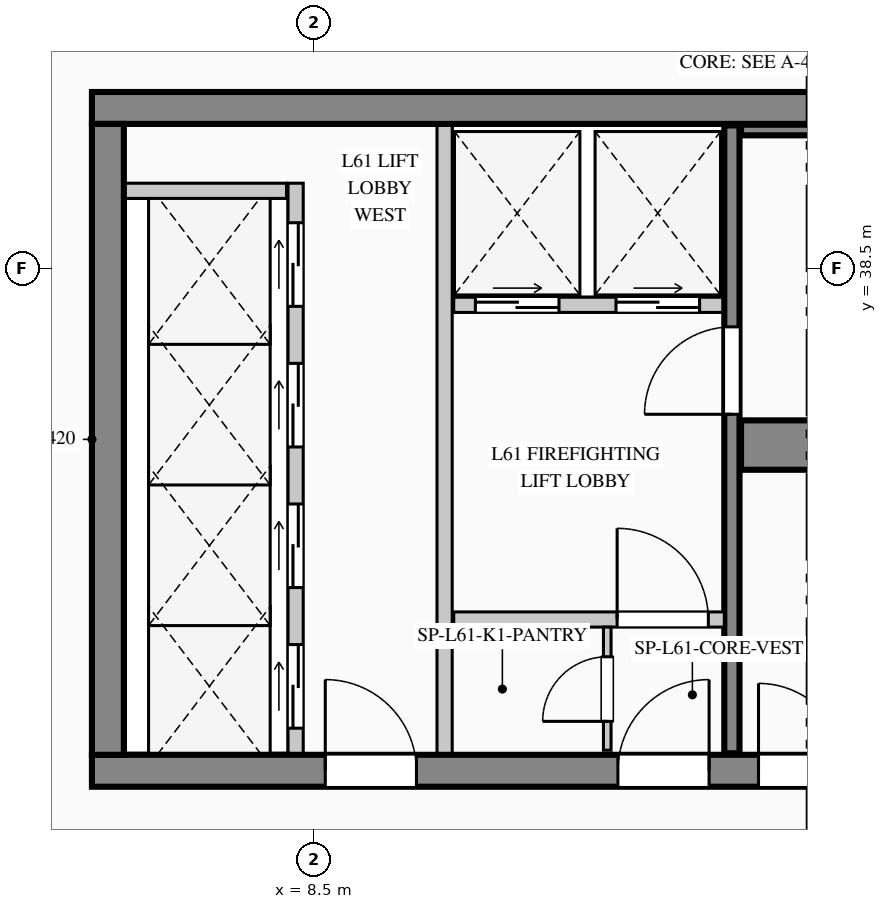
"""IFC4 building model, lengths in metres.
Left out: names, types, materials, properties, quantities, classifications, styles, units other than length and angle.
Written with IfcOpenShell. Run it as: python <this file> out.ifc"""

import sys

from ifc_helpers import new_model, si_unit, direction, frame, frame_2d, origin, place, context, subcontext, project, spatial, rectangle, extrude, element, fill, save


model = new_model("IFC4")
c1 = context("Model", 3, precision=1e-05, world=origin(), true_north=direction((0.0, 1.0)))
c2 = subcontext(c1, "Body", "Model", "MODEL_VIEW")
j1 = project(units=[si_unit("LENGTHUNIT", "METRE"), si_unit("PLANEANGLEUNIT", "RADIAN")], contexts=[c1])
p1 = place(None, origin())
s1 = spatial("IfcSite", under=j1, at=p1, CompositionType="ELEMENT")
p2 = place(p1, origin())
s2 = spatial("IfcBuilding", under=s1, at=p2, CompositionType="ELEMENT")
p3 = place(p2, frame((0.0, 0.0, 256.7)))
s3 = spatial("IfcBuildingStorey", under=s2, at=p3, CompositionType="ELEMENT", Elevation=256.7)
p4 = place(p3, frame((5.58, 40.61, 0.0), z_axis=(0.0, 0.0, 1.0), x_axis=(1.0, 0.0, 0.0)))
e1 = element("IfcWall", 1, at=p4, inside=s3, PredefinedType="SHEAR", context=c2, shape_type="SweptSolid", body=[
    extrude(rectangle(XDim=17.69, YDim=0.42, at=frame_2d((8.845, 0.0))), origin(), (0.0, 0.0, 1.0), 3.95),
])
p5 = place(p4, frame((15.865, 0.0, 0.0)))
e2 = element("IfcOpeningElement", 2, at=p5, cuts=e1, PredefinedType="OPENING", context=c2, shape_type="SweptSolid", body=[
    extrude(rectangle(XDim=1.18, YDim=2.25, at=frame_2d((0.59, 1.125))), frame((0.0, 0.22, 0.0), z_axis=(0.0, -1.0, 0.0), x_axis=(1.0, 0.0, 0.0)), (0.0, 0.0, 1.0), 0.44),
])
p6 = place(p3, frame((5.58, 31.89, 0.0), z_axis=(0.0, 0.0, 1.0), x_axis=(1.0, 0.0, 0.0)))
e3 = element("IfcWall", 3, at=p6, inside=s3, PredefinedType="SHEAR", context=c2, shape_type="SweptSolid", body=[
    extrude(rectangle(XDim=17.69, YDim=0.42, at=frame_2d((8.845, 0.0))), origin(), (0.0, 0.0, 1.0), 3.95),
])
p7 = place(p6, frame((3.07, 0.0, 0.0)))
e4 = element("IfcOpeningElement", 4, at=p7, cuts=e3, PredefinedType="OPENING", context=c2, shape_type="SweptSolid", body=[
    extrude(rectangle(XDim=1.2, YDim=2.2, at=frame_2d((0.6, 1.1))), frame((0.0, 0.22, 0.0), z_axis=(0.0, -1.0, 0.0), x_axis=(1.0, 0.0, 0.0)), (0.0, 0.0, 1.0), 0.44),
])
p8 = place(p6, frame((6.92, 0.0, 0.0)))
e5 = element("IfcOpeningElement", 5, at=p8, cuts=e3, PredefinedType="OPENING", context=c2, shape_type="SweptSolid", body=[
    extrude(rectangle(XDim=1.2, YDim=2.2, at=frame_2d((0.6, 1.1))), frame((0.0, 0.22, 0.0), z_axis=(0.0, -1.0, 0.0), x_axis=(1.0, 0.0, 0.0)), (0.0, 0.0, 1.0), 0.44),
])
p9 = place(p6, frame((8.77, 0.0, 0.0)))
e6 = element("IfcOpeningElement", 6, at=p9, cuts=e3, PredefinedType="OPENING", context=c2, shape_type="SweptSolid", body=[
    extrude(rectangle(XDim=1.15, YDim=2.2, at=frame_2d((0.575, 1.1))), frame((0.0, 0.22, 0.0), z_axis=(0.0, -1.0, 0.0), x_axis=(1.0, 0.0, 0.0)), (0.0, 0.0, 1.0), 0.44),
])
p10 = place(p6, frame((15.87, 0.0, 0.0)))
e7 = element("IfcOpeningElement", 7, at=p10, cuts=e3, PredefinedType="OPENING", context=c2, shape_type="SweptSolid", body=[
    extrude(rectangle(XDim=1.2, YDim=2.2, at=frame_2d((0.6, 1.1))), frame((0.0, 0.22, 0.0), z_axis=(0.0, -1.0, 0.0), x_axis=(1.0, 0.0, 0.0)), (0.0, 0.0, 1.0), 0.44),
])
p11 = place(p3, frame((5.79, 32.1, 0.0), z_axis=(0.0, 0.0, 1.0), x_axis=(0.0, 1.0, 0.0)))
e8 = element("IfcWall", 8, at=p11, inside=s3, PredefinedType="SHEAR", context=c2, shape_type="SweptSolid", body=[
    extrude(rectangle(XDim=8.3, YDim=0.42, at=frame_2d((4.15, 0.0))), origin(), (0.0, 0.0, 1.0), 3.95),
])
p12 = place(p3, frame((14.0, 32.12, 0.0), z_axis=(0.0, 0.0, 1.0), x_axis=(0.0, 1.0, 0.0)))
e9 = element("IfcWall", 9, at=p12, inside=s3, PredefinedType="SHEAR", context=c2, shape_type="SweptSolid", body=[
    extrude(rectangle(XDim=8.26, YDim=0.2, at=frame_2d((4.13, 0.0))), origin(), (0.0, 0.0, 1.0), 3.95),
])
p13 = place(p12, frame((4.46, 0.0, 0.0)))
e10 = element("IfcOpeningElement", 10, at=p13, cuts=e9, PredefinedType="OPENING", context=c2, shape_type="SweptSolid", body=[
    extrude(rectangle(XDim=1.15, YDim=2.2, at=frame_2d((0.575, 1.1))), frame((0.0, 0.11, 0.0), z_axis=(0.0, -1.0, 0.0), x_axis=(1.0, 0.0, 0.0)), (0.0, 0.0, 1.0), 0.22),
])
p14 = place(p3, frame((14.12, 36.175, 0.0), z_axis=(0.0, 0.0, 1.0), x_axis=(1.0, 0.0, 0.0)))
e11 = element("IfcWall", 11, at=p14, inside=s3, PredefinedType="SHEAR", context=c2, shape_type="SweptSolid", body=[
    extrude(rectangle(XDim=7.01, YDim=0.65, at=frame_2d((3.505, 0.0))), origin(), (0.0, 0.0, 1.0), 3.95),
])
p15 = place(p3, frame((14.12, 40.32, 0.0), z_axis=(0.0, 0.0, 1.0), x_axis=(1.0, 0.0, 0.0)))
e12 = element("IfcWall", 12, at=p15, inside=s3, PredefinedType="SHEAR", context=c2, shape_type="SweptSolid", body=[
    extrude(rectangle(XDim=7.01, YDim=0.14, at=frame_2d((3.505, 0.0))), origin(), (0.0, 0.0, 1.0), 3.95),
])
p16 = place(p3, frame((6.133, 4.42, 0.0), z_axis=(0.0, 0.0, 1.0), x_axis=(-0.089522678378, 0.995984784048, 0.0)))
e13 = element("IfcWall", 13, at=p16, inside=s3, PredefinedType="STANDARD", context=c2, shape_type="SweptSolid", body=[
    extrude(rectangle(XDim=37.31, YDim=0.24, at=frame_2d((18.655, 0.0))), origin(), (0.0, 0.0, 1.0), 3.7),
])
p17 = place(p16, frame((23.053, 0.0, 0.9)))
e14 = element("IfcOpeningElement", 14, at=p17, cuts=e13, PredefinedType="OPENING", context=c2, shape_type="SweptSolid", body=[
    extrude(rectangle(XDim=1.65, YDim=1.95, at=frame_2d((0.825, 0.975))), frame((0.0, 0.13, 0.0), z_axis=(0.0, -1.0, 0.0), x_axis=(1.0, 0.0, 0.0)), (0.0, 0.0, 1.0), 0.26),
])
p18 = place(p3, frame((8.26, 32.12, 0.0), z_axis=(0.0, 0.0, 1.0), x_axis=(0.0, 1.0, 0.0)))
e15 = element("IfcWall", 15, at=p18, inside=s3, PredefinedType="PARTITIONING", context=c2, shape_type="SweptSolid", body=[
    extrude(rectangle(XDim=7.5, YDim=0.2, at=frame_2d((3.75, 0.0))), origin(), (0.0, 0.0, 1.0), 3.7),
])
p19 = place(p18, frame((0.33, 0.0, 0.0)))
e16 = element("IfcOpeningElement", 16, at=p19, cuts=e15, PredefinedType="OPENING", context=c2, shape_type="SweptSolid", body=[
    extrude(rectangle(XDim=1.1, YDim=2.2, at=frame_2d((0.55, 1.1))), frame((0.0, 0.11, 0.0), z_axis=(0.0, -1.0, 0.0), x_axis=(1.0, 0.0, 0.0)), (0.0, 0.0, 1.0), 0.22),
])
p20 = place(p18, frame((2.18, 0.0, 0.0)))
e17 = element("IfcOpeningElement", 17, at=p20, cuts=e15, PredefinedType="OPENING", context=c2, shape_type="SweptSolid", body=[
    extrude(rectangle(XDim=1.1, YDim=2.2, at=frame_2d((0.55, 1.1))), frame((0.0, 0.11, 0.0), z_axis=(0.0, -1.0, 0.0), x_axis=(1.0, 0.0, 0.0)), (0.0, 0.0, 1.0), 0.22),
])
p21 = place(p18, frame((4.03, 0.0, 0.0)))
e18 = element("IfcOpeningElement", 18, at=p21, cuts=e15, PredefinedType="OPENING", context=c2, shape_type="SweptSolid", body=[
    extrude(rectangle(XDim=1.1, YDim=2.2, at=frame_2d((0.55, 1.1))), frame((0.0, 0.11, 0.0), z_axis=(0.0, -1.0, 0.0), x_axis=(1.0, 0.0, 0.0)), (0.0, 0.0, 1.0), 0.22),
])
p22 = place(p18, frame((5.88, 0.0, 0.0)))
e19 = element("IfcOpeningElement", 19, at=p22, cuts=e15, PredefinedType="OPENING", context=c2, shape_type="SweptSolid", body=[
    extrude(rectangle(XDim=1.1, YDim=2.2, at=frame_2d((0.55, 1.1))), frame((0.0, 0.11, 0.0), z_axis=(0.0, -1.0, 0.0), x_axis=(1.0, 0.0, 0.0)), (0.0, 0.0, 1.0), 0.22),
])
p23 = place(p3, frame((6.02, 39.52, 0.0), z_axis=(0.0, 0.0, 1.0), x_axis=(1.0, 0.0, 0.0)))
e20 = element("IfcWall", 20, at=p23, inside=s3, PredefinedType="PARTITIONING", context=c2, shape_type="SweptSolid", body=[
    extrude(rectangle(XDim=2.12, YDim=0.2, at=frame_2d((1.06, 0.0))), origin(), (0.0, 0.0, 1.0), 3.7),
])
p24 = place(p3, frame((10.22, 32.12, 0.0), z_axis=(0.0, 0.0, 1.0), x_axis=(0.0, 1.0, 0.0)))
e21 = element("IfcWall", 21, at=p24, inside=s3, PredefinedType="PARTITIONING", context=c2, shape_type="SweptSolid", body=[
    extrude(rectangle(XDim=8.26, YDim=0.2, at=frame_2d((4.13, 0.0))), origin(), (0.0, 0.0, 1.0), 3.7),
])
p25 = place(p3, frame((10.34, 38.02, 0.0), z_axis=(0.0, 0.0, 1.0), x_axis=(1.0, 0.0, 0.0)))
e22 = element("IfcWall", 22, at=p25, inside=s3, PredefinedType="PARTITIONING", context=c2, shape_type="SweptSolid", body=[
    extrude(rectangle(XDim=3.54, YDim=0.2, at=frame_2d((1.77, 0.0))), origin(), (0.0, 0.0, 1.0), 3.7),
])
p26 = place(p25, frame((0.285, 0.0, 0.0)))
e23 = element("IfcOpeningElement", 23, at=p26, cuts=e22, PredefinedType="OPENING", context=c2, shape_type="SweptSolid", body=[
    extrude(rectangle(XDim=1.1, YDim=2.2, at=frame_2d((0.55, 1.1))), frame((0.0, 0.11, 0.0), z_axis=(0.0, -1.0, 0.0), x_axis=(1.0, 0.0, 0.0)), (0.0, 0.0, 1.0), 0.22),
])
p27 = place(p25, frame((2.135, 0.0, 0.0)))
e24 = element("IfcOpeningElement", 24, at=p27, cuts=e22, PredefinedType="OPENING", context=c2, shape_type="SweptSolid", body=[
    extrude(rectangle(XDim=1.1, YDim=2.2, at=frame_2d((0.55, 1.1))), frame((0.0, 0.11, 0.0), z_axis=(0.0, -1.0, 0.0), x_axis=(1.0, 0.0, 0.0)), (0.0, 0.0, 1.0), 0.22),
])
p28 = place(p3, frame((10.34, 33.88, 0.0), z_axis=(0.0, 0.0, 1.0), x_axis=(1.0, 0.0, 0.0)))
e25 = element("IfcWall", 25, at=p28, inside=s3, PredefinedType="PARTITIONING", context=c2, shape_type="SweptSolid", body=[
    extrude(rectangle(XDim=3.56, YDim=0.2, at=frame_2d((1.78, 0.0))), origin(), (0.0, 0.0, 1.0), 3.7),
])
p29 = place(p28, frame((2.15, 0.0, 0.0)))
e26 = element("IfcOpeningElement", 26, at=p29, cuts=e25, PredefinedType="OPENING", context=c2, shape_type="SweptSolid", body=[
    extrude(rectangle(XDim=1.2, YDim=2.2, at=frame_2d((0.6, 1.1))), frame((0.0, 0.11, 0.0), z_axis=(0.0, -1.0, 0.0), x_axis=(1.0, 0.0, 0.0)), (0.0, 0.0, 1.0), 0.22),
])
p30 = place(p3, frame((12.36, 32.16, 0.0), z_axis=(0.0, 0.0, 1.0), x_axis=(0.0, 1.0, 0.0)))
e27 = element("IfcWall", 27, at=p30, inside=s3, PredefinedType="PARTITIONING", context=c2, shape_type="SweptSolid", body=[
    extrude(rectangle(XDim=1.62, YDim=0.1, at=frame_2d((0.81, 0.0))), origin(), (0.0, 0.0, 1.0), 3.7),
])
p31 = place(p30, frame((0.38, 0.0, 0.0)))
e28 = element("IfcOpeningElement", 28, at=p31, cuts=e27, PredefinedType="OPENING", context=c2, shape_type="SweptSolid", body=[
    extrude(rectangle(XDim=0.85, YDim=2.1, at=frame_2d((0.425, 1.05))), frame((0.0, 0.06, 0.0), z_axis=(0.0, -1.0, 0.0), x_axis=(1.0, 0.0, 0.0)), (0.0, 0.0, 1.0), 0.12),
])
p32 = place(p7, origin())
e29 = element("IfcDoor", 29, at=p32, inside=s3, OperationType="SINGLE_SWING_LEFT", PredefinedType="DOOR", context=c2, shape_type="SweptSolid", body=[
    extrude(rectangle(XDim=1.2, YDim=2.2, at=frame_2d((0.6, 1.1))), frame((0.0, 0.025, 0.0), z_axis=(0.0, -1.0, 0.0), x_axis=(1.0, 0.0, 0.0)), (0.0, 0.0, 1.0), 0.05),
])
fill(e4, e29)
p33 = place(p8, origin())
e30 = element("IfcDoor", 30, at=p33, inside=s3, OperationType="SINGLE_SWING_RIGHT", PredefinedType="DOOR", context=c2, shape_type="SweptSolid", body=[
    extrude(rectangle(XDim=1.2, YDim=2.2, at=frame_2d((0.6, 1.1))), frame((0.0, 0.025, 0.0), z_axis=(0.0, -1.0, 0.0), x_axis=(1.0, 0.0, 0.0)), (0.0, 0.0, 1.0), 0.05),
])
fill(e5, e30)
p34 = place(p9, origin())
e31 = element("IfcDoor", 31, at=p34, inside=s3, OperationType="SINGLE_SWING_LEFT", PredefinedType="DOOR", context=c2, shape_type="SweptSolid", body=[
    extrude(rectangle(XDim=1.15, YDim=2.2, at=frame_2d((0.575, 1.1))), frame((0.0, 0.025, 0.0), z_axis=(0.0, -1.0, 0.0), x_axis=(1.0, 0.0, 0.0)), (0.0, 0.0, 1.0), 0.05),
])
fill(e6, e31)
p35 = place(p29, origin())
e32 = element("IfcDoor", 32, at=p35, inside=s3, OperationType="SINGLE_SWING_LEFT", PredefinedType="DOOR", context=c2, shape_type="SweptSolid", body=[
    extrude(rectangle(XDim=1.2, YDim=2.2, at=frame_2d((0.6, 1.1))), frame((0.0, 0.025, 0.0), z_axis=(0.0, -1.0, 0.0), x_axis=(1.0, 0.0, 0.0)), (0.0, 0.0, 1.0), 0.05),
])
fill(e26, e32)
p36 = place(p31, origin())
e33 = element("IfcDoor", 33, at=p36, inside=s3, OperationType="SINGLE_SWING_LEFT", PredefinedType="DOOR", context=c2, shape_type="SweptSolid", body=[
    extrude(rectangle(XDim=0.85, YDim=2.1, at=frame_2d((0.425, 1.05))), frame((0.0, 0.025, 0.0), z_axis=(0.0, -1.0, 0.0), x_axis=(1.0, 0.0, 0.0)), (0.0, 0.0, 1.0), 0.05),
])
fill(e28, e33)
p37 = place(p13, origin())
e34 = element("IfcDoor", 34, at=p37, inside=s3, OperationType="SINGLE_SWING_LEFT", PredefinedType="DOOR", context=c2, shape_type="SweptSolid", body=[
    extrude(rectangle(XDim=1.15, YDim=2.2, at=frame_2d((0.575, 1.1))), frame((0.0, 0.025, 0.0), z_axis=(0.0, -1.0, 0.0), x_axis=(1.0, 0.0, 0.0)), (0.0, 0.0, 1.0), 0.05),
])
fill(e10, e34)
p38 = place(p19, origin())
e35 = element("IfcDoor", 35, at=p38, inside=s3, OperationType="DOUBLE_DOOR_SLIDING", PredefinedType="DOOR", context=c2, shape_type="SweptSolid", body=[
    extrude(rectangle(XDim=1.1, YDim=2.2, at=frame_2d((0.55, 1.1))), frame((0.0, 0.025, 0.0), z_axis=(0.0, -1.0, 0.0), x_axis=(1.0, 0.0, 0.0)), (0.0, 0.0, 1.0), 0.05),
])
fill(e16, e35)
p39 = place(p20, origin())
e36 = element("IfcDoor", 36, at=p39, inside=s3, OperationType="DOUBLE_DOOR_SLIDING", PredefinedType="DOOR", context=c2, shape_type="SweptSolid", body=[
    extrude(rectangle(XDim=1.1, YDim=2.2, at=frame_2d((0.55, 1.1))), frame((0.0, 0.025, 0.0), z_axis=(0.0, -1.0, 0.0), x_axis=(1.0, 0.0, 0.0)), (0.0, 0.0, 1.0), 0.05),
])
fill(e17, e36)
p40 = place(p21, origin())
e37 = element("IfcDoor", 37, at=p40, inside=s3, OperationType="DOUBLE_DOOR_SLIDING", PredefinedType="DOOR", context=c2, shape_type="SweptSolid", body=[
    extrude(rectangle(XDim=1.1, YDim=2.2, at=frame_2d((0.55, 1.1))), frame((0.0, 0.025, 0.0), z_axis=(0.0, -1.0, 0.0), x_axis=(1.0, 0.0, 0.0)), (0.0, 0.0, 1.0), 0.05),
])
fill(e18, e37)
p41 = place(p22, origin())
e38 = element("IfcDoor", 38, at=p41, inside=s3, OperationType="DOUBLE_DOOR_SLIDING", PredefinedType="DOOR", context=c2, shape_type="SweptSolid", body=[
    extrude(rectangle(XDim=1.1, YDim=2.2, at=frame_2d((0.55, 1.1))), frame((0.0, 0.025, 0.0), z_axis=(0.0, -1.0, 0.0), x_axis=(1.0, 0.0, 0.0)), (0.0, 0.0, 1.0), 0.05),
])
fill(e19, e38)
p42 = place(p26, origin())
e39 = element("IfcDoor", 39, at=p42, inside=s3, OperationType="DOUBLE_DOOR_SLIDING", PredefinedType="DOOR", context=c2, shape_type="SweptSolid", body=[
    extrude(rectangle(XDim=1.1, YDim=2.2, at=frame_2d((0.55, 1.1))), frame((0.0, 0.025, 0.0), z_axis=(0.0, -1.0, 0.0), x_axis=(1.0, 0.0, 0.0)), (0.0, 0.0, 1.0), 0.05),
])
fill(e23, e39)
p43 = place(p27, origin())
e40 = element("IfcDoor", 40, at=p43, inside=s3, OperationType="DOUBLE_DOOR_SLIDING", PredefinedType="DOOR", context=c2, shape_type="SweptSolid", body=[
    extrude(rectangle(XDim=1.1, YDim=2.2, at=frame_2d((0.55, 1.1))), frame((0.0, 0.025, 0.0), z_axis=(0.0, -1.0, 0.0), x_axis=(1.0, 0.0, 0.0)), (0.0, 0.0, 1.0), 0.05),
])
fill(e24, e40)
save(model, sys.argv[1])
